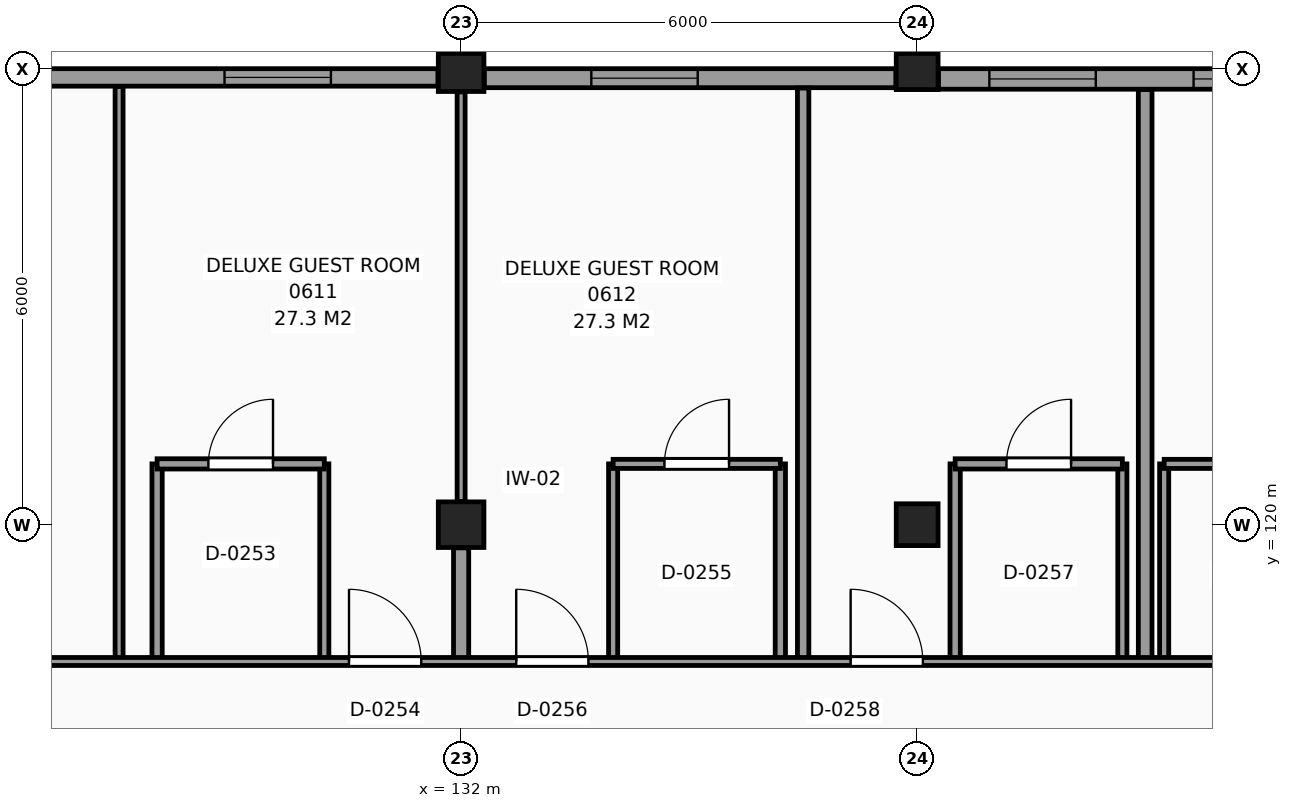
"""IFC4 building model, lengths in metres.
Left out: names, types, materials, properties, quantities, classifications, styles, units other than length and angle.
Written with IfcOpenShell. Run it as: python <this file> out.ifc"""

import sys

from ifc_helpers import new_model, si_unit, direction, frame, frame_2d, origin, origin_2d, place, context, subcontext, project, spatial, rectangle, extrude, element, fill, save


model = new_model("IFC4")
c1 = context("Model", 3, precision=1e-05, world=origin(), true_north=direction((0.0, 1.0)))
c2 = subcontext(c1, "Body", "Model", "MODEL_VIEW")
j1 = project(units=[si_unit("LENGTHUNIT", "METRE"), si_unit("PLANEANGLEUNIT", "RADIAN")], contexts=[c1])
p1 = place(None, origin())
s1 = spatial("IfcSite", under=j1, at=p1, CompositionType="ELEMENT")
p2 = place(p1, origin())
s2 = spatial("IfcBuilding", under=s1, at=p2, CompositionType="ELEMENT")
p3 = place(p2, frame((0.0, 0.0, 28.2)))
s3 = spatial("IfcBuildingStorey", under=s2, at=p3, CompositionType="ELEMENT", Elevation=28.2)
for number, where, z_axis, x_axis in (
    (1, (132.0, 120.0, 0.0), (0.0, 0.0, 1.0), (1.0, 0.0, 0.0)),
    (2, (132.0, 126.0, 0.0), (0.0, 0.0, 1.0), (1.0, 0.0, 0.0)),
):
    element("IfcColumn", number, at=place(p3, frame(where, z_axis=z_axis, x_axis=x_axis)), inside=s3, PredefinedType="COLUMN", context=c2, shape_type="SweptSolid", body=[
        extrude(rectangle(XDim=0.6, YDim=0.6, at=origin_2d()), origin(), (0.0, 0.0, 1.0), 3.3),
    ])
for number, where, z_axis, x_axis in (
    (3, (138.0, 120.0, 0.0), (0.0, 0.0, 1.0), (1.0, 0.0, 0.0)),
    (4, (138.0, 126.0, 0.0), (0.0, 0.0, 1.0), (1.0, 0.0, 0.0)),
):
    element("IfcColumn", number, at=place(p3, frame(where, z_axis=z_axis, x_axis=x_axis)), inside=s3, PredefinedType="COLUMN", context=c2, shape_type="SweptSolid", body=[
        extrude(rectangle(XDim=0.55, YDim=0.55, at=origin_2d()), origin(), (0.0, 0.0, 1.0), 3.3),
    ])
p4 = place(p3, frame((143.695, 125.865, 0.0), z_axis=(0.0, 0.0, 1.0), x_axis=(-1.0, 0.0, 0.0)))
e5 = element("IfcWall", 5, at=p4, inside=s3, PredefinedType="SOLIDWALL", context=c2, shape_type="SweptSolid", body=[
    extrude(rectangle(XDim=5.415, YDim=0.27, at=frame_2d((2.708, 0.0))), origin(), (0.0, 0.0, 1.0), 2.43),
])
p5 = place(p4, frame((3.345, 0.0, 0.8)))
e6 = element("IfcOpeningElement", 6, at=p5, cuts=e5, PredefinedType="OPENING", context=c2, shape_type="SweptSolid", body=[
    extrude(rectangle(XDim=1.4, YDim=1.4, at=frame_2d((0.7, 0.7))), frame((0.0, 0.145, 0.0), z_axis=(0.0, -1.0, 0.0), x_axis=(1.0, 0.0, 0.0)), (0.0, 0.0, 1.0), 0.29),
])
p6 = place(p4, frame((0.658, 0.0, 0.8)))
e7 = element("IfcOpeningElement", 7, at=p6, cuts=e5, PredefinedType="OPENING", context=c2, shape_type="SweptSolid", body=[
    extrude(rectangle(XDim=1.4, YDim=1.4, at=frame_2d((0.7, 0.7))), frame((0.0, 0.145, 0.0), z_axis=(0.0, -1.0, 0.0), x_axis=(1.0, 0.0, 0.0)), (0.0, 0.0, 1.0), 0.29),
])
p7 = place(p3, frame((137.72, 125.875, 0.0), z_axis=(0.0, 0.0, 1.0), x_axis=(-1.0, 0.0, 0.0)))
e8 = element("IfcWall", 8, at=p7, inside=s3, PredefinedType="SOLIDWALL", context=c2, shape_type="SweptSolid", body=[
    extrude(rectangle(XDim=5.415, YDim=0.25, at=frame_2d((2.708, 0.0))), origin(), (0.0, 0.0, 1.0), 2.43),
])
p8 = place(p7, frame((2.607, 0.0, 0.8)))
e9 = element("IfcOpeningElement", 9, at=p8, cuts=e8, PredefinedType="OPENING", context=c2, shape_type="SweptSolid", body=[
    extrude(rectangle(XDim=1.4, YDim=1.4, at=frame_2d((0.7, 0.7))), frame((0.0, 0.135, 0.0), z_axis=(0.0, -1.0, 0.0), x_axis=(1.0, 0.0, 0.0)), (0.0, 0.0, 1.0), 0.27),
])
p9 = place(p3, frame((131.695, 125.885, 0.0), z_axis=(0.0, 0.0, 1.0), x_axis=(-1.0, 0.0, 0.0)))
e10 = element("IfcWall", 10, at=p9, inside=s3, PredefinedType="SOLIDWALL", context=c2, shape_type="SweptSolid", body=[
    extrude(rectangle(XDim=5.415, YDim=0.23, at=frame_2d((2.708, 0.0))), origin(), (0.0, 0.0, 1.0), 2.43),
])
p10 = place(p9, frame((1.408, 0.0, 0.8)))
e11 = element("IfcOpeningElement", 11, at=p10, cuts=e10, PredefinedType="OPENING", context=c2, shape_type="SweptSolid", body=[
    extrude(rectangle(XDim=1.4, YDim=1.4, at=frame_2d((0.7, 0.7))), frame((0.0, 0.125, 0.0), z_axis=(0.0, -1.0, 0.0), x_axis=(1.0, 0.0, 0.0)), (0.0, 0.0, 1.0), 0.25),
])
p11 = place(p3, frame((127.5, 118.2, 0.0), z_axis=(0.0, 0.0, 1.0), x_axis=(0.0, 1.0, 0.0)))
e12 = element("IfcWall", 12, at=p11, inside=s3, PredefinedType="PARTITIONING", context=c2, shape_type="SweptSolid", body=[
    extrude(rectangle(XDim=7.565, YDim=0.105, at=frame_2d((3.782, 0.0))), origin(), (0.0, 0.0, 1.0), 3.08),
])
p12 = place(p3, frame((128.0, 118.2, 0.0), z_axis=(0.0, 0.0, 1.0), x_axis=(0.0, 1.0, 0.0)))
e13 = element("IfcWall", 13, at=p12, inside=s3, PredefinedType="PARTITIONING", context=c2, shape_type="SweptSolid", body=[
    extrude(rectangle(XDim=2.6, YDim=0.135, at=frame_2d((1.3, 0.0))), origin(), (0.0, 0.0, 1.0), 3.08),
])
p13 = place(p3, frame((130.2, 118.2, 0.0), z_axis=(0.0, 0.0, 1.0), x_axis=(0.0, 1.0, 0.0)))
e14 = element("IfcWall", 14, at=p13, inside=s3, PredefinedType="PARTITIONING", context=c2, shape_type="SweptSolid", body=[
    extrude(rectangle(XDim=2.6, YDim=0.12, at=frame_2d((1.3, 0.0))), origin(), (0.0, 0.0, 1.0), 3.08),
])
p14 = place(p3, frame((132.0, 118.2, 0.0), z_axis=(0.0, 0.0, 1.0), x_axis=(0.0, 1.0, 0.0)))
e15 = element("IfcWall", 15, at=p14, inside=s3, PredefinedType="PARTITIONING", context=c2, shape_type="SweptSolid", body=[
    extrude(rectangle(XDim=1.495, YDim=0.2, at=frame_2d((0.748, 0.0))), origin(), (0.0, 0.0, 1.0), 2.28),
])
p15 = place(p3, frame((132.0, 120.305, 0.0), z_axis=(0.0, 0.0, 1.0), x_axis=(0.0, 1.0, 0.0)))
e16 = element("IfcWall", 16, at=p15, inside=s3, PredefinedType="PARTITIONING", context=c2, shape_type="SweptSolid", body=[
    extrude(rectangle(XDim=5.39, YDim=0.105, at=frame_2d((2.695, 0.0))), origin(), (0.0, 0.0, 1.0), 2.28),
])
p16 = place(p3, frame((134.0, 118.2, 0.0), z_axis=(0.0, 0.0, 1.0), x_axis=(0.0, 1.0, 0.0)))
e17 = element("IfcWall", 17, at=p16, inside=s3, PredefinedType="PARTITIONING", context=c2, shape_type="SweptSolid", body=[
    extrude(rectangle(XDim=2.6, YDim=0.12, at=frame_2d((1.3, 0.0))), origin(), (0.0, 0.0, 1.0), 3.08),
])
p17 = place(p3, frame((136.2, 118.2, 0.0), z_axis=(0.0, 0.0, 1.0), x_axis=(0.0, 1.0, 0.0)))
e18 = element("IfcWall", 18, at=p17, inside=s3, PredefinedType="PARTITIONING", context=c2, shape_type="SweptSolid", body=[
    extrude(rectangle(XDim=2.6, YDim=0.135, at=frame_2d((1.3, 0.0))), origin(), (0.0, 0.0, 1.0), 3.08),
])
p18 = place(p3, frame((136.5, 118.2, 0.0), z_axis=(0.0, 0.0, 1.0), x_axis=(0.0, 1.0, 0.0)))
e19 = element("IfcWall", 19, at=p18, inside=s3, PredefinedType="PARTITIONING", context=c2, shape_type="SweptSolid", body=[
    extrude(rectangle(XDim=7.545, YDim=0.15, at=frame_2d((3.772, 0.0))), origin(), (0.0, 0.0, 1.0), 3.08),
])
p19 = place(p3, frame((138.5, 118.2, 0.0), z_axis=(0.0, 0.0, 1.0), x_axis=(0.0, 1.0, 0.0)))
e20 = element("IfcWall", 20, at=p19, inside=s3, PredefinedType="PARTITIONING", context=c2, shape_type="SweptSolid", body=[
    extrude(rectangle(XDim=2.6, YDim=0.135, at=frame_2d((1.3, 0.0))), origin(), (0.0, 0.0, 1.0), 3.08),
])
p20 = place(p3, frame((140.7, 118.2, 0.0), z_axis=(0.0, 0.0, 1.0), x_axis=(0.0, 1.0, 0.0)))
e21 = element("IfcWall", 21, at=p20, inside=s3, PredefinedType="PARTITIONING", context=c2, shape_type="SweptSolid", body=[
    extrude(rectangle(XDim=2.6, YDim=0.12, at=frame_2d((1.3, 0.0))), origin(), (0.0, 0.0, 1.0), 3.08),
])
p21 = place(p3, frame((141.0, 118.2, 0.0), z_axis=(0.0, 0.0, 1.0), x_axis=(0.0, 1.0, 0.0)))
e22 = element("IfcWall", 22, at=p21, inside=s3, PredefinedType="PARTITIONING", context=c2, shape_type="SweptSolid", body=[
    extrude(rectangle(XDim=7.525, YDim=0.18, at=frame_2d((3.763, 0.0))), origin(), (0.0, 0.0, 1.0), 3.08),
])
p22 = place(p3, frame((141.25, 118.2, 0.0), z_axis=(0.0, 0.0, 1.0), x_axis=(0.0, 1.0, 0.0)))
e23 = element("IfcWall", 23, at=p22, inside=s3, PredefinedType="PARTITIONING", context=c2, shape_type="SweptSolid", body=[
    extrude(rectangle(XDim=2.6, YDim=0.12, at=frame_2d((1.3, 0.0))), origin(), (0.0, 0.0, 1.0), 3.08),
])
p23 = place(p3, frame((66.235, 118.2, 0.0), z_axis=(0.0, 0.0, 1.0), x_axis=(1.0, 0.0, 0.0)))
e24 = element("IfcWall", 24, at=p23, inside=s3, PredefinedType="PARTITIONING", context=c2, shape_type="SweptSolid", body=[
    extrude(rectangle(XDim=110.265, YDim=0.105, at=frame_2d((55.132, 0.0))), origin(), (0.0, 0.0, 1.0), 3.08),
])
p24 = place(p23, frame((0.49, 0.0, 0.0)))
e25 = element("IfcOpeningElement", 25, at=p24, cuts=e24, PredefinedType="OPENING", context=c2, shape_type="SweptSolid", body=[
    extrude(rectangle(XDim=0.95, YDim=2.1, at=frame_2d((0.475, 1.05))), frame((0.0, 0.062, 0.0), z_axis=(0.0, -1.0, 0.0), x_axis=(1.0, 0.0, 0.0)), (0.0, 0.0, 1.0), 0.125),
])
p25 = place(p23, frame((4.89, 0.0, 0.0)))
e26 = element("IfcOpeningElement", 26, at=p25, cuts=e24, PredefinedType="OPENING", context=c2, shape_type="SweptSolid", body=[
    extrude(rectangle(XDim=0.95, YDim=2.1, at=frame_2d((0.475, 1.05))), frame((0.0, 0.062, 0.0), z_axis=(0.0, -1.0, 0.0), x_axis=(1.0, 0.0, 0.0)), (0.0, 0.0, 1.0), 0.125),
])
p26 = place(p23, frame((9.39, 0.0, 0.0)))
e27 = element("IfcOpeningElement", 27, at=p26, cuts=e24, PredefinedType="OPENING", context=c2, shape_type="SweptSolid", body=[
    extrude(rectangle(XDim=0.95, YDim=2.1, at=frame_2d((0.475, 1.05))), frame((0.0, 0.062, 0.0), z_axis=(0.0, -1.0, 0.0), x_axis=(1.0, 0.0, 0.0)), (0.0, 0.0, 1.0), 0.125),
])
p27 = place(p23, frame((24.09, 0.0, 0.0)))
e28 = element("IfcOpeningElement", 28, at=p27, cuts=e24, PredefinedType="OPENING", context=c2, shape_type="SweptSolid", body=[
    extrude(rectangle(XDim=0.95, YDim=2.1, at=frame_2d((0.475, 1.05))), frame((0.0, 0.062, 0.0), z_axis=(0.0, -1.0, 0.0), x_axis=(1.0, 0.0, 0.0)), (0.0, 0.0, 1.0), 0.125),
])
p28 = place(p23, frame((32.34, 0.0, 0.0)))
e29 = element("IfcOpeningElement", 29, at=p28, cuts=e24, PredefinedType="OPENING", context=c2, shape_type="SweptSolid", body=[
    extrude(rectangle(XDim=0.95, YDim=2.1, at=frame_2d((0.475, 1.05))), frame((0.0, 0.062, 0.0), z_axis=(0.0, -1.0, 0.0), x_axis=(1.0, 0.0, 0.0)), (0.0, 0.0, 1.0), 0.125),
])
p29 = place(p23, frame((34.89, 0.0, 0.0)))
e30 = element("IfcOpeningElement", 30, at=p29, cuts=e24, PredefinedType="OPENING", context=c2, shape_type="SweptSolid", body=[
    extrude(rectangle(XDim=0.95, YDim=2.1, at=frame_2d((0.475, 1.05))), frame((0.0, 0.062, 0.0), z_axis=(0.0, -1.0, 0.0), x_axis=(1.0, 0.0, 0.0)), (0.0, 0.0, 1.0), 0.125),
])
p30 = place(p23, frame((42.09, 0.0, 0.0)))
e31 = element("IfcOpeningElement", 31, at=p30, cuts=e24, PredefinedType="OPENING", context=c2, shape_type="SweptSolid", body=[
    extrude(rectangle(XDim=0.95, YDim=2.1, at=frame_2d((0.475, 1.05))), frame((0.0, 0.062, 0.0), z_axis=(0.0, -1.0, 0.0), x_axis=(1.0, 0.0, 0.0)), (0.0, 0.0, 1.0), 0.125),
])
p31 = place(p23, frame((46.29, 0.0, 0.0)))
e32 = element("IfcOpeningElement", 32, at=p31, cuts=e24, PredefinedType="OPENING", context=c2, shape_type="SweptSolid", body=[
    extrude(rectangle(XDim=0.95, YDim=2.1, at=frame_2d((0.475, 1.05))), frame((0.0, 0.062, 0.0), z_axis=(0.0, -1.0, 0.0), x_axis=(1.0, 0.0, 0.0)), (0.0, 0.0, 1.0), 0.125),
])
p32 = place(p23, frame((48.49, 0.0, 0.0)))
e33 = element("IfcOpeningElement", 33, at=p32, cuts=e24, PredefinedType="OPENING", context=c2, shape_type="SweptSolid", body=[
    extrude(rectangle(XDim=0.95, YDim=2.1, at=frame_2d((0.475, 1.05))), frame((0.0, 0.062, 0.0), z_axis=(0.0, -1.0, 0.0), x_axis=(1.0, 0.0, 0.0)), (0.0, 0.0, 1.0), 0.125),
])
p33 = place(p23, frame((54.49, 0.0, 0.0)))
e34 = element("IfcOpeningElement", 34, at=p33, cuts=e24, PredefinedType="OPENING", context=c2, shape_type="SweptSolid", body=[
    extrude(rectangle(XDim=0.95, YDim=2.1, at=frame_2d((0.475, 1.05))), frame((0.0, 0.062, 0.0), z_axis=(0.0, -1.0, 0.0), x_axis=(1.0, 0.0, 0.0)), (0.0, 0.0, 1.0), 0.125),
])
p34 = place(p23, frame((64.29, 0.0, 0.0)))
e35 = element("IfcOpeningElement", 35, at=p34, cuts=e24, PredefinedType="OPENING", context=c2, shape_type="SweptSolid", body=[
    extrude(rectangle(XDim=0.95, YDim=2.1, at=frame_2d((0.475, 1.05))), frame((0.0, 0.062, 0.0), z_axis=(0.0, -1.0, 0.0), x_axis=(1.0, 0.0, 0.0)), (0.0, 0.0, 1.0), 0.125),
])
p35 = place(p23, frame((66.49, 0.0, 0.0)))
e36 = element("IfcOpeningElement", 36, at=p35, cuts=e24, PredefinedType="OPENING", context=c2, shape_type="SweptSolid", body=[
    extrude(rectangle(XDim=0.95, YDim=2.1, at=frame_2d((0.475, 1.05))), frame((0.0, 0.062, 0.0), z_axis=(0.0, -1.0, 0.0), x_axis=(1.0, 0.0, 0.0)), (0.0, 0.0, 1.0), 0.125),
])
p36 = place(p23, frame((70.89, 0.0, 0.0)))
e37 = element("IfcOpeningElement", 37, at=p36, cuts=e24, PredefinedType="OPENING", context=c2, shape_type="SweptSolid", body=[
    extrude(rectangle(XDim=0.95, YDim=2.1, at=frame_2d((0.475, 1.05))), frame((0.0, 0.062, 0.0), z_axis=(0.0, -1.0, 0.0), x_axis=(1.0, 0.0, 0.0)), (0.0, 0.0, 1.0), 0.125),
])
p37 = place(p23, frame((78.09, 0.0, 0.0)))
e38 = element("IfcOpeningElement", 38, at=p37, cuts=e24, PredefinedType="OPENING", context=c2, shape_type="SweptSolid", body=[
    extrude(rectangle(XDim=0.95, YDim=2.1, at=frame_2d((0.475, 1.05))), frame((0.0, 0.062, 0.0), z_axis=(0.0, -1.0, 0.0), x_axis=(1.0, 0.0, 0.0)), (0.0, 0.0, 1.0), 0.125),
])
p38 = place(p23, frame((86.34, 0.0, 0.0)))
e39 = element("IfcOpeningElement", 39, at=p38, cuts=e24, PredefinedType="OPENING", context=c2, shape_type="SweptSolid", body=[
    extrude(rectangle(XDim=0.95, YDim=2.1, at=frame_2d((0.475, 1.05))), frame((0.0, 0.062, 0.0), z_axis=(0.0, -1.0, 0.0), x_axis=(1.0, 0.0, 0.0)), (0.0, 0.0, 1.0), 0.125),
])
p39 = place(p23, frame((88.89, 0.0, 0.0)))
e40 = element("IfcOpeningElement", 40, at=p39, cuts=e24, PredefinedType="OPENING", context=c2, shape_type="SweptSolid", body=[
    extrude(rectangle(XDim=0.95, YDim=2.1, at=frame_2d((0.475, 1.05))), frame((0.0, 0.062, 0.0), z_axis=(0.0, -1.0, 0.0), x_axis=(1.0, 0.0, 0.0)), (0.0, 0.0, 1.0), 0.125),
])
p40 = place(p23, frame((93.39, 0.0, 0.0)))
e41 = element("IfcOpeningElement", 41, at=p40, cuts=e24, PredefinedType="OPENING", context=c2, shape_type="SweptSolid", body=[
    extrude(rectangle(XDim=0.95, YDim=2.1, at=frame_2d((0.475, 1.05))), frame((0.0, 0.062, 0.0), z_axis=(0.0, -1.0, 0.0), x_axis=(1.0, 0.0, 0.0)), (0.0, 0.0, 1.0), 0.125),
])
p41 = place(p23, frame((104.99, 0.0, 0.0)))
e42 = element("IfcOpeningElement", 42, at=p41, cuts=e24, PredefinedType="OPENING", context=c2, shape_type="SweptSolid", body=[
    extrude(rectangle(XDim=0.95, YDim=2.1, at=frame_2d((0.475, 1.05))), frame((0.0, 0.062, 0.0), z_axis=(0.0, -1.0, 0.0), x_axis=(1.0, 0.0, 0.0)), (0.0, 0.0, 1.0), 0.125),
])
p42 = place(p3, frame((128.0, 120.8, 0.0), z_axis=(0.0, 0.0, 1.0), x_axis=(1.0, 0.0, 0.0)))
e43 = element("IfcWall", 43, at=p42, inside=s3, PredefinedType="PARTITIONING", context=c2, shape_type="SweptSolid", body=[
    extrude(rectangle(XDim=2.2, YDim=0.135, at=frame_2d((1.1, 0.0))), origin(), (0.0, 0.0, 1.0), 3.08),
])
p43 = place(p42, frame((0.675, 0.0, 0.0)))
e44 = element("IfcOpeningElement", 44, at=p43, cuts=e43, PredefinedType="OPENING", context=c2, shape_type="SweptSolid", body=[
    extrude(rectangle(XDim=0.85, YDim=2.1, at=frame_2d((0.425, 1.05))), frame((0.0, 0.078, 0.0), z_axis=(0.0, -1.0, 0.0), x_axis=(1.0, 0.0, 0.0)), (0.0, 0.0, 1.0), 0.155),
])
p44 = place(p3, frame((134.0, 120.8, 0.0), z_axis=(0.0, 0.0, 1.0), x_axis=(1.0, 0.0, 0.0)))
e45 = element("IfcWall", 45, at=p44, inside=s3, PredefinedType="PARTITIONING", context=c2, shape_type="SweptSolid", body=[
    extrude(rectangle(XDim=2.2, YDim=0.12, at=frame_2d((1.1, 0.0))), origin(), (0.0, 0.0, 1.0), 3.08),
])
p45 = place(p44, frame((0.675, 0.0, 0.0)))
e46 = element("IfcOpeningElement", 46, at=p45, cuts=e45, PredefinedType="OPENING", context=c2, shape_type="SweptSolid", body=[
    extrude(rectangle(XDim=0.85, YDim=2.1, at=frame_2d((0.425, 1.05))), frame((0.0, 0.07, 0.0), z_axis=(0.0, -1.0, 0.0), x_axis=(1.0, 0.0, 0.0)), (0.0, 0.0, 1.0), 0.14),
])
p46 = place(p3, frame((138.5, 120.8, 0.0), z_axis=(0.0, 0.0, 1.0), x_axis=(1.0, 0.0, 0.0)))
e47 = element("IfcWall", 47, at=p46, inside=s3, PredefinedType="PARTITIONING", context=c2, shape_type="SweptSolid", body=[
    extrude(rectangle(XDim=2.2, YDim=0.135, at=frame_2d((1.1, 0.0))), origin(), (0.0, 0.0, 1.0), 3.08),
])
p47 = place(p46, frame((0.675, 0.0, 0.0)))
e48 = element("IfcOpeningElement", 48, at=p47, cuts=e47, PredefinedType="OPENING", context=c2, shape_type="SweptSolid", body=[
    extrude(rectangle(XDim=0.85, YDim=2.1, at=frame_2d((0.425, 1.05))), frame((0.0, 0.078, 0.0), z_axis=(0.0, -1.0, 0.0), x_axis=(1.0, 0.0, 0.0)), (0.0, 0.0, 1.0), 0.155),
])
p48 = place(p3, frame((141.25, 120.8, 0.0), z_axis=(0.0, 0.0, 1.0), x_axis=(1.0, 0.0, 0.0)))
e49 = element("IfcWall", 49, at=p48, inside=s3, PredefinedType="PARTITIONING", context=c2, shape_type="SweptSolid", body=[
    extrude(rectangle(XDim=2.2, YDim=0.12, at=frame_2d((1.1, 0.0))), origin(), (0.0, 0.0, 1.0), 3.08),
])
p49 = place(p48, frame((0.675, 0.0, 0.0)))
e50 = element("IfcOpeningElement", 50, at=p49, cuts=e49, PredefinedType="OPENING", context=c2, shape_type="SweptSolid", body=[
    extrude(rectangle(XDim=0.85, YDim=2.1, at=frame_2d((0.425, 1.05))), frame((0.0, 0.07, 0.0), z_axis=(0.0, -1.0, 0.0), x_axis=(1.0, 0.0, 0.0)), (0.0, 0.0, 1.0), 0.14),
])
p50 = place(p10, origin())
e51 = element("IfcWindow", 51, at=p50, inside=s3, PartitioningType="SINGLE_PANEL", PredefinedType="WINDOW", context=c2, shape_type="SweptSolid", body=[
    extrude(rectangle(XDim=1.4, YDim=1.4, at=frame_2d((0.7, 0.7))), frame((0.0, 0.03, 0.0), z_axis=(0.0, -1.0, 0.0), x_axis=(1.0, 0.0, 0.0)), (0.0, 0.0, 1.0), 0.06),
])
fill(e11, e51)
p51 = place(p8, origin())
e52 = element("IfcWindow", 52, at=p51, inside=s3, PartitioningType="SINGLE_PANEL", PredefinedType="WINDOW", context=c2, shape_type="SweptSolid", body=[
    extrude(rectangle(XDim=1.4, YDim=1.4, at=frame_2d((0.7, 0.7))), frame((0.0, 0.03, 0.0), z_axis=(0.0, -1.0, 0.0), x_axis=(1.0, 0.0, 0.0)), (0.0, 0.0, 1.0), 0.06),
])
fill(e9, e52)
p52 = place(p5, origin())
e53 = element("IfcWindow", 53, at=p52, inside=s3, PartitioningType="SINGLE_PANEL", PredefinedType="WINDOW", context=c2, shape_type="SweptSolid", body=[
    extrude(rectangle(XDim=1.4, YDim=1.4, at=frame_2d((0.7, 0.7))), frame((0.0, 0.03, 0.0), z_axis=(0.0, -1.0, 0.0), x_axis=(1.0, 0.0, 0.0)), (0.0, 0.0, 1.0), 0.06),
])
fill(e6, e53)
p53 = place(p6, origin())
e54 = element("IfcWindow", 54, at=p53, inside=s3, PartitioningType="SINGLE_PANEL", PredefinedType="WINDOW", context=c2, shape_type="SweptSolid", body=[
    extrude(rectangle(XDim=1.4, YDim=1.4, at=frame_2d((0.7, 0.7))), frame((0.0, 0.03, 0.0), z_axis=(0.0, -1.0, 0.0), x_axis=(1.0, 0.0, 0.0)), (0.0, 0.0, 1.0), 0.06),
])
fill(e7, e54)
p54 = place(p43, origin())
e55 = element("IfcDoor", 55, at=p54, inside=s3, OperationType="SINGLE_SWING_RIGHT", PredefinedType="DOOR", context=c2, shape_type="SweptSolid", body=[
    extrude(rectangle(XDim=0.85, YDim=2.1, at=frame_2d((0.425, 1.05))), frame((0.0, 0.025, 0.0), z_axis=(0.0, -1.0, 0.0), x_axis=(1.0, 0.0, 0.0)), (0.0, 0.0, 1.0), 0.05),
])
fill(e44, e55)
p55 = place(p34, origin())
e56 = element("IfcDoor", 56, at=p55, inside=s3, OperationType="SINGLE_SWING_LEFT", PredefinedType="DOOR", context=c2, shape_type="SweptSolid", body=[
    extrude(rectangle(XDim=0.95, YDim=2.1, at=frame_2d((0.475, 1.05))), frame((0.0, 0.025, 0.0), z_axis=(0.0, -1.0, 0.0), x_axis=(1.0, 0.0, 0.0)), (0.0, 0.0, 1.0), 0.05),
])
fill(e35, e56)
p56 = place(p45, origin())
e57 = element("IfcDoor", 57, at=p56, inside=s3, OperationType="SINGLE_SWING_RIGHT", PredefinedType="DOOR", context=c2, shape_type="SweptSolid", body=[
    extrude(rectangle(XDim=0.85, YDim=2.1, at=frame_2d((0.425, 1.05))), frame((0.0, 0.025, 0.0), z_axis=(0.0, -1.0, 0.0), x_axis=(1.0, 0.0, 0.0)), (0.0, 0.0, 1.0), 0.05),
])
fill(e46, e57)
p57 = place(p35, origin())
e58 = element("IfcDoor", 58, at=p57, inside=s3, OperationType="SINGLE_SWING_LEFT", PredefinedType="DOOR", context=c2, shape_type="SweptSolid", body=[
    extrude(rectangle(XDim=0.95, YDim=2.1, at=frame_2d((0.475, 1.05))), frame((0.0, 0.025, 0.0), z_axis=(0.0, -1.0, 0.0), x_axis=(1.0, 0.0, 0.0)), (0.0, 0.0, 1.0), 0.05),
])
fill(e36, e58)
p58 = place(p47, origin())
e59 = element("IfcDoor", 59, at=p58, inside=s3, OperationType="SINGLE_SWING_RIGHT", PredefinedType="DOOR", context=c2, shape_type="SweptSolid", body=[
    extrude(rectangle(XDim=0.85, YDim=2.1, at=frame_2d((0.425, 1.05))), frame((0.0, 0.025, 0.0), z_axis=(0.0, -1.0, 0.0), x_axis=(1.0, 0.0, 0.0)), (0.0, 0.0, 1.0), 0.05),
])
fill(e48, e59)
p59 = place(p36, origin())
e60 = element("IfcDoor", 60, at=p59, inside=s3, OperationType="SINGLE_SWING_LEFT", PredefinedType="DOOR", context=c2, shape_type="SweptSolid", body=[
    extrude(rectangle(XDim=0.95, YDim=2.1, at=frame_2d((0.475, 1.05))), frame((0.0, 0.025, 0.0), z_axis=(0.0, -1.0, 0.0), x_axis=(1.0, 0.0, 0.0)), (0.0, 0.0, 1.0), 0.05),
])
fill(e37, e60)
save(model, sys.argv[1])
